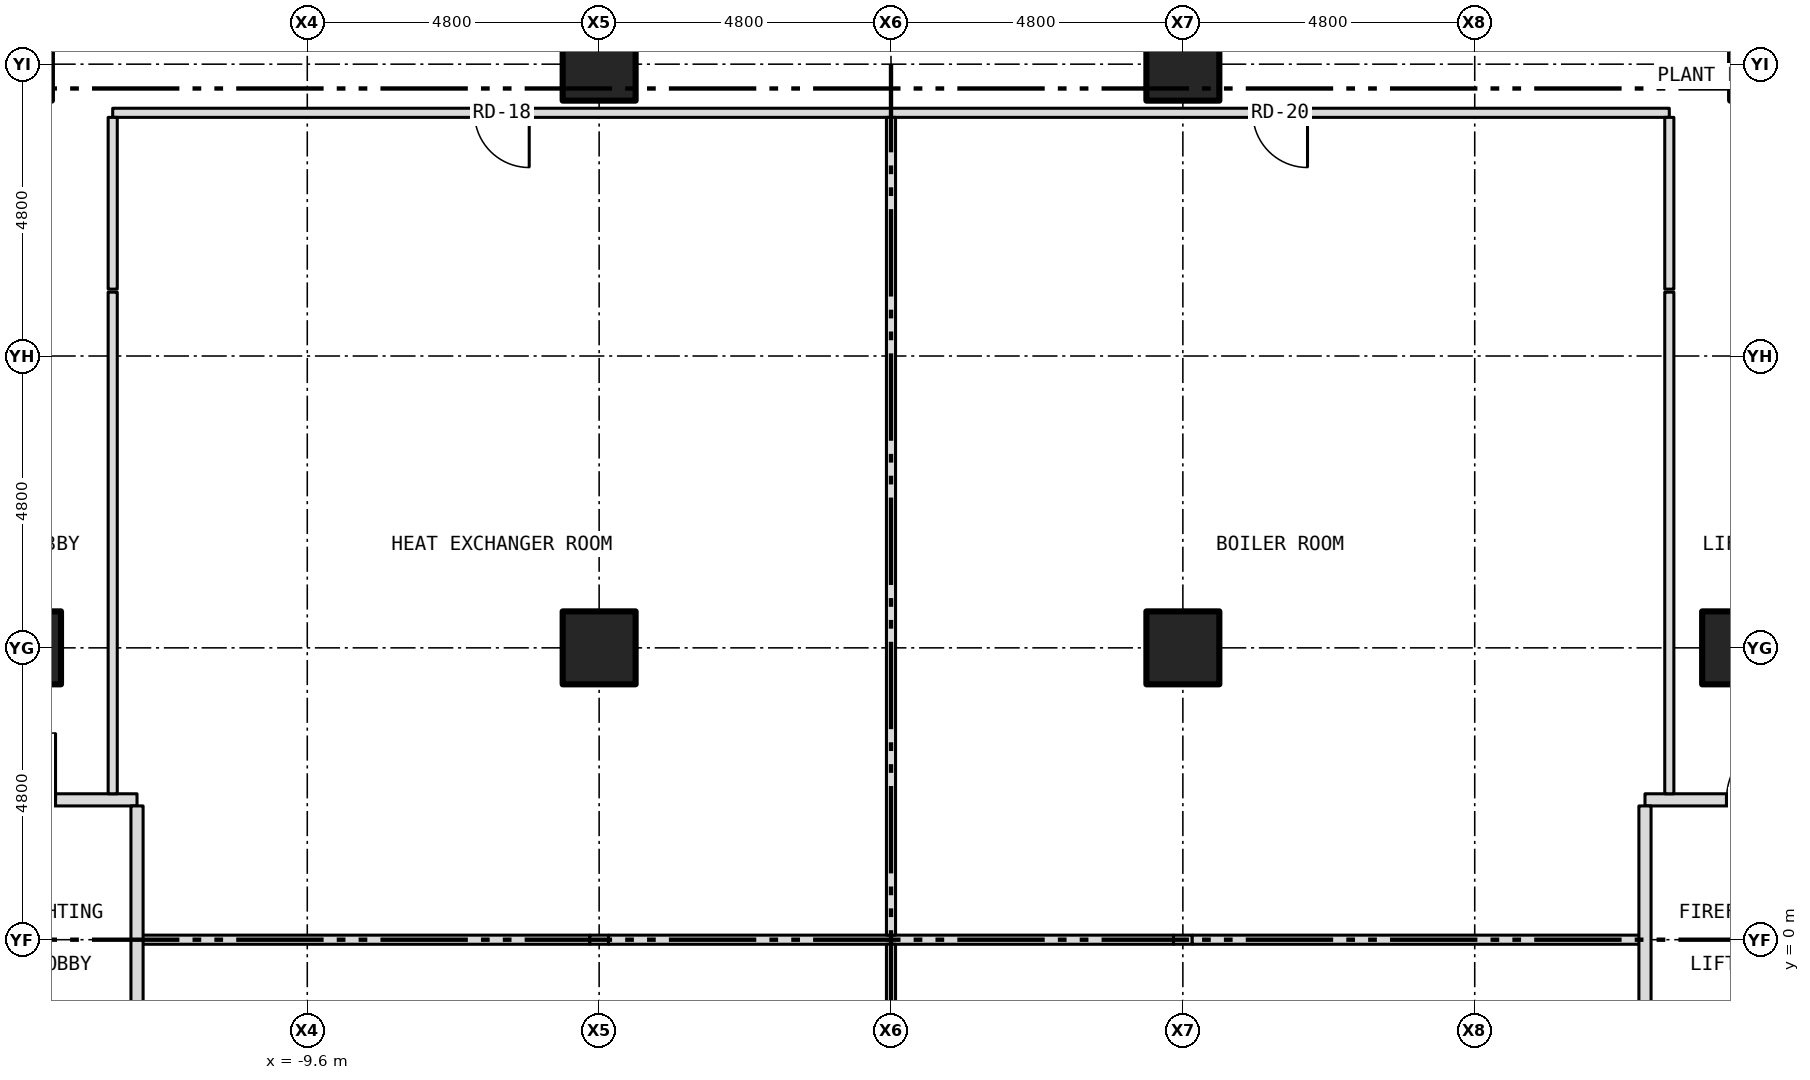
"""IFC4 building model, lengths in metres.
Left out: names, types, materials, properties, quantities, classifications, styles, units other than length and angle.
Written with IfcOpenShell. Run it as: python <this file> out.ifc"""

import sys

from ifc_helpers import new_model, si_unit, direction, frame, frame_2d, origin, origin_2d, place, context, subcontext, project, spatial, rectangle, hollow_rectangle, extrude, element, fill, save


model = new_model("IFC4")
c1 = context("Model", 3, precision=1e-05, world=origin(), true_north=direction((0.0, 1.0)))
c2 = subcontext(c1, "Body", "Model", "MODEL_VIEW")
j1 = project(units=[si_unit("LENGTHUNIT", "METRE"), si_unit("PLANEANGLEUNIT", "RADIAN")], contexts=[c1])
p1 = place(None, origin())
s1 = spatial("IfcSite", under=j1, at=p1, CompositionType="ELEMENT")
p2 = place(p1, origin())
s2 = spatial("IfcBuilding", under=s1, at=p2, CompositionType="ELEMENT")
p3 = place(p2, frame((0.0, 0.0, 33.5)))
s3 = spatial("IfcBuildingStorey", under=s2, at=p3, CompositionType="ELEMENT", Elevation=33.5)
for number, where, z_axis, x_axis in (
    (1, (-14.25, 4.8, -0.3), (0.0, 0.0, 1.0), (1.0, 0.0, 0.0)),
    (2, (-14.4, 14.4, -0.3), (0.0, 0.0, 1.0), (1.0, 0.0, 0.0)),
    (3, (-4.8, 4.8, -0.3), (0.0, 0.0, 1.0), (1.0, 0.0, 0.0)),
    (4, (-4.8, 14.4, -0.3), (0.0, 0.0, 1.0), (1.0, 0.0, 0.0)),
    (5, (4.8, 4.8, -0.3), (0.0, 0.0, 1.0), (1.0, 0.0, 0.0)),
    (6, (4.8, 14.4, -0.3), (0.0, 0.0, 1.0), (1.0, 0.0, 0.0)),
    (7, (13.94, 4.8, -0.3), (0.0, 0.0, 1.0), (1.0, 0.0, 0.0)),
    (8, (14.4, 14.4, -0.3), (0.0, 0.0, 1.0), (1.0, 0.0, 0.0)),
):
    element("IfcColumn", number, at=place(p3, frame(where, z_axis=z_axis, x_axis=x_axis)), inside=s3, PredefinedType="COLUMN", context=c2, shape_type="SweptSolid", body=[
        extrude(hollow_rectangle(XDim=1.2, YDim=1.2, WallThickness=0.07, at=origin_2d()), origin(), (0.0, 0.0, 1.0), 5.65),
    ])
p4 = place(p3, frame((-12.4, 0.0, 0.0), z_axis=(0.0, 0.0, 1.0), x_axis=(1.0, 0.0, 0.0)))
e9 = element("IfcWall", 9, at=p4, inside=s3, PredefinedType="PARTITIONING", context=c2, shape_type="SweptSolid", body=[
    extrude(rectangle(XDim=7.446, YDim=0.15, at=frame_2d((3.723, 0.0))), origin(), (0.0, 0.0, 1.0), 4.359),
])
p5 = place(p3, frame((-4.954, 0.0, 0.0), z_axis=(0.0, 0.0, 1.0), x_axis=(1.0, 0.0, 0.0)))
e10 = element("IfcWall", 10, at=p5, inside=s3, PredefinedType="PARTITIONING", context=c2, shape_type="SweptSolid", body=[
    extrude(rectangle(XDim=0.308, YDim=0.15, at=frame_2d((0.154, 0.0))), origin(), (0.0, 0.0, 1.0), 5.35),
])
p6 = place(p3, frame((-4.646, 0.0, 0.0), z_axis=(0.0, 0.0, 1.0), x_axis=(1.0, 0.0, 0.0)))
e11 = element("IfcWall", 11, at=p6, inside=s3, PredefinedType="PARTITIONING", context=c2, shape_type="SweptSolid", body=[
    extrude(rectangle(XDim=9.292, YDim=0.15, at=frame_2d((4.646, 0.0))), origin(), (0.0, 0.0, 1.0), 4.359),
])
p7 = place(p3, frame((4.646, 0.0, 0.0), z_axis=(0.0, 0.0, 1.0), x_axis=(1.0, 0.0, 0.0)))
e12 = element("IfcWall", 12, at=p7, inside=s3, PredefinedType="PARTITIONING", context=c2, shape_type="SweptSolid", body=[
    extrude(rectangle(XDim=0.308, YDim=0.15, at=frame_2d((0.154, 0.0))), origin(), (0.0, 0.0, 1.0), 5.35),
])
p8 = place(p3, frame((4.954, 0.0, 0.0), z_axis=(0.0, 0.0, 1.0), x_axis=(1.0, 0.0, 0.0)))
e13 = element("IfcWall", 13, at=p8, inside=s3, PredefinedType="PARTITIONING", context=c2, shape_type="SweptSolid", body=[
    extrude(rectangle(XDim=7.446, YDim=0.15, at=frame_2d((3.723, 0.0))), origin(), (0.0, 0.0, 1.0), 4.359),
])
p9 = place(p3, frame((-15.68, 2.3, 0.0), z_axis=(0.0, 0.0, 1.0), x_axis=(1.0, 0.0, 0.0)))
e14 = element("IfcWall", 14, at=p9, inside=s3, PredefinedType="PARTITIONING", context=c2, shape_type="SweptSolid", body=[
    extrude(rectangle(XDim=3.28, YDim=0.2, at=frame_2d((1.64, 0.0))), origin(), (0.0, 0.0, 1.0), 5.35),
])
p10 = place(p9, frame((0.84, 0.0, 0.0)))
e15 = element("IfcOpeningElement", 15, at=p10, cuts=e14, PredefinedType="OPENING", context=c2, shape_type="SweptSolid", body=[
    extrude(rectangle(XDim=1.1, YDim=2.1, at=frame_2d((0.55, 1.05))), frame((0.0, 0.112, 0.0), z_axis=(0.0, -1.0, 0.0), x_axis=(1.0, 0.0, 0.0)), (0.0, 0.0, 1.0), 0.224),
])
p11 = place(p3, frame((12.4, 2.3, 0.0), z_axis=(0.0, 0.0, 1.0), x_axis=(1.0, 0.0, 0.0)))
e16 = element("IfcWall", 16, at=p11, inside=s3, PredefinedType="PARTITIONING", context=c2, shape_type="SweptSolid", body=[
    extrude(rectangle(XDim=3.28, YDim=0.2, at=frame_2d((1.64, 0.0))), origin(), (0.0, 0.0, 1.0), 5.35),
])
p12 = place(p11, frame((1.34, 0.0, 0.0)))
e17 = element("IfcOpeningElement", 17, at=p12, cuts=e16, PredefinedType="OPENING", context=c2, shape_type="SweptSolid", body=[
    extrude(rectangle(XDim=1.1, YDim=2.1, at=frame_2d((0.55, 1.05))), frame((0.0, 0.112, 0.0), z_axis=(0.0, -1.0, 0.0), x_axis=(1.0, 0.0, 0.0)), (0.0, 0.0, 1.0), 0.224),
])
p13 = place(p3, frame((-12.8, 13.6, 0.0), z_axis=(0.0, 0.0, 1.0), x_axis=(1.0, 0.0, 0.0)))
e18 = element("IfcWall", 18, at=p13, inside=s3, PredefinedType="PARTITIONING", context=c2, shape_type="SweptSolid", body=[
    extrude(rectangle(XDim=25.6, YDim=0.15, at=frame_2d((12.8, 0.0))), origin(), (0.0, 0.0, 1.0), 5.35),
])
p14 = place(p13, frame((5.95, 0.0, 0.0)))
e19 = element("IfcOpeningElement", 19, at=p14, cuts=e18, PredefinedType="OPENING", context=c2, shape_type="SweptSolid", body=[
    extrude(rectangle(XDim=0.9, YDim=2.1, at=frame_2d((0.45, 1.05))), frame((0.0, 0.087, 0.0), z_axis=(0.0, -1.0, 0.0), x_axis=(1.0, 0.0, 0.0)), (0.0, 0.0, 1.0), 0.174),
])
p15 = place(p13, frame((18.75, 0.0, 0.0)))
e20 = element("IfcOpeningElement", 20, at=p15, cuts=e18, PredefinedType="OPENING", context=c2, shape_type="SweptSolid", body=[
    extrude(rectangle(XDim=0.9, YDim=2.1, at=frame_2d((0.45, 1.05))), frame((0.0, 0.087, 0.0), z_axis=(0.0, -1.0, 0.0), x_axis=(1.0, 0.0, 0.0)), (0.0, 0.0, 1.0), 0.174),
])
p16 = place(p3, frame((-12.8, 2.4, 0.0), z_axis=(0.0, 0.0, 1.0), x_axis=(0.0, 1.0, 0.0)))
e21 = element("IfcWall", 21, at=p16, inside=s3, PredefinedType="PARTITIONING", context=c2, shape_type="SweptSolid", body=[
    extrude(rectangle(XDim=8.25, YDim=0.15, at=frame_2d((4.125, 0.0))), origin(), (0.0, 0.0, 1.0), 5.35),
])
p17 = place(p3, frame((-12.8, 10.7, 0.0), z_axis=(0.0, 0.0, 1.0), x_axis=(0.0, 1.0, 0.0)))
e22 = element("IfcWall", 22, at=p17, inside=s3, PredefinedType="PARTITIONING", context=c2, shape_type="SweptSolid", body=[
    extrude(rectangle(XDim=2.825, YDim=0.15, at=frame_2d((1.413, 0.0))), origin(), (0.0, 0.0, 1.0), 5.35),
])
p18 = place(p3, frame((-12.4, -1.8, 0.0), z_axis=(0.0, 0.0, 1.0), x_axis=(0.0, 1.0, 0.0)))
e23 = element("IfcWall", 23, at=p18, inside=s3, PredefinedType="PARTITIONING", context=c2, shape_type="SweptSolid", body=[
    extrude(rectangle(XDim=4.0, YDim=0.2, at=frame_2d((2.0, 0.0))), origin(), (0.0, 0.0, 1.0), 5.35),
])
for number, where, z_axis, x_axis in (
    (24, (0.0, -13.525, 0.0), (0.0, 0.0, 1.0), (0.0, 1.0, 0.0)),
    (25, (0.0, 0.075, 0.0), (0.0, 0.0, 1.0), (0.0, 1.0, 0.0)),
):
    element("IfcWall", number, at=place(p3, frame(where, z_axis=z_axis, x_axis=x_axis)), inside=s3, PredefinedType="PARTITIONING", context=c2, shape_type="SweptSolid", body=[
        extrude(rectangle(XDim=13.45, YDim=0.15, at=frame_2d((6.725, 0.0))), origin(), (0.0, 0.0, 1.0), 5.35),
    ])
p19 = place(p3, frame((12.4, -1.8, 0.0), z_axis=(0.0, 0.0, 1.0), x_axis=(0.0, 1.0, 0.0)))
e26 = element("IfcWall", 26, at=p19, inside=s3, PredefinedType="PARTITIONING", context=c2, shape_type="SweptSolid", body=[
    extrude(rectangle(XDim=4.0, YDim=0.2, at=frame_2d((2.0, 0.0))), origin(), (0.0, 0.0, 1.0), 5.35),
])
p20 = place(p3, frame((12.8, 2.4, 0.0), z_axis=(0.0, 0.0, 1.0), x_axis=(0.0, 1.0, 0.0)))
e27 = element("IfcWall", 27, at=p20, inside=s3, PredefinedType="PARTITIONING", context=c2, shape_type="SweptSolid", body=[
    extrude(rectangle(XDim=8.25, YDim=0.15, at=frame_2d((4.125, 0.0))), origin(), (0.0, 0.0, 1.0), 5.35),
])
p21 = place(p3, frame((12.8, 10.7, 0.0), z_axis=(0.0, 0.0, 1.0), x_axis=(0.0, 1.0, 0.0)))
e28 = element("IfcWall", 28, at=p21, inside=s3, PredefinedType="PARTITIONING", context=c2, shape_type="SweptSolid", body=[
    extrude(rectangle(XDim=2.825, YDim=0.15, at=frame_2d((1.413, 0.0))), origin(), (0.0, 0.0, 1.0), 5.35),
])
p22 = place(p10, origin())
e29 = element("IfcDoor", 29, at=p22, inside=s3, OperationType="SINGLE_SWING_RIGHT", PredefinedType="DOOR", context=c2, shape_type="SweptSolid", body=[
    extrude(rectangle(XDim=1.1, YDim=2.1, at=frame_2d((0.55, 1.05))), frame((0.0, 0.025, 0.0), z_axis=(0.0, -1.0, 0.0), x_axis=(1.0, 0.0, 0.0)), (0.0, 0.0, 1.0), 0.05),
])
fill(e15, e29)
p23 = place(p12, origin())
e30 = element("IfcDoor", 30, at=p23, inside=s3, OperationType="SINGLE_SWING_RIGHT", PredefinedType="DOOR", context=c2, shape_type="SweptSolid", body=[
    extrude(rectangle(XDim=1.1, YDim=2.1, at=frame_2d((0.55, 1.05))), frame((0.0, 0.025, 0.0), z_axis=(0.0, -1.0, 0.0), x_axis=(1.0, 0.0, 0.0)), (0.0, 0.0, 1.0), 0.05),
])
fill(e17, e30)
p24 = place(p14, origin())
e31 = element("IfcDoor", 31, at=p24, inside=s3, OperationType="SINGLE_SWING_RIGHT", PredefinedType="DOOR", context=c2, shape_type="SweptSolid", body=[
    extrude(rectangle(XDim=0.9, YDim=2.1, at=frame_2d((0.45, 1.05))), frame((0.0, 0.025, 0.0), z_axis=(0.0, -1.0, 0.0), x_axis=(1.0, 0.0, 0.0)), (0.0, 0.0, 1.0), 0.05),
])
fill(e19, e31)
p25 = place(p15, origin())
e32 = element("IfcDoor", 32, at=p25, inside=s3, OperationType="SINGLE_SWING_RIGHT", PredefinedType="DOOR", context=c2, shape_type="SweptSolid", body=[
    extrude(rectangle(XDim=0.9, YDim=2.1, at=frame_2d((0.45, 1.05))), frame((0.0, 0.025, 0.0), z_axis=(0.0, -1.0, 0.0), x_axis=(1.0, 0.0, 0.0)), (0.0, 0.0, 1.0), 0.05),
])
fill(e20, e32)
save(model, sys.argv[1])
